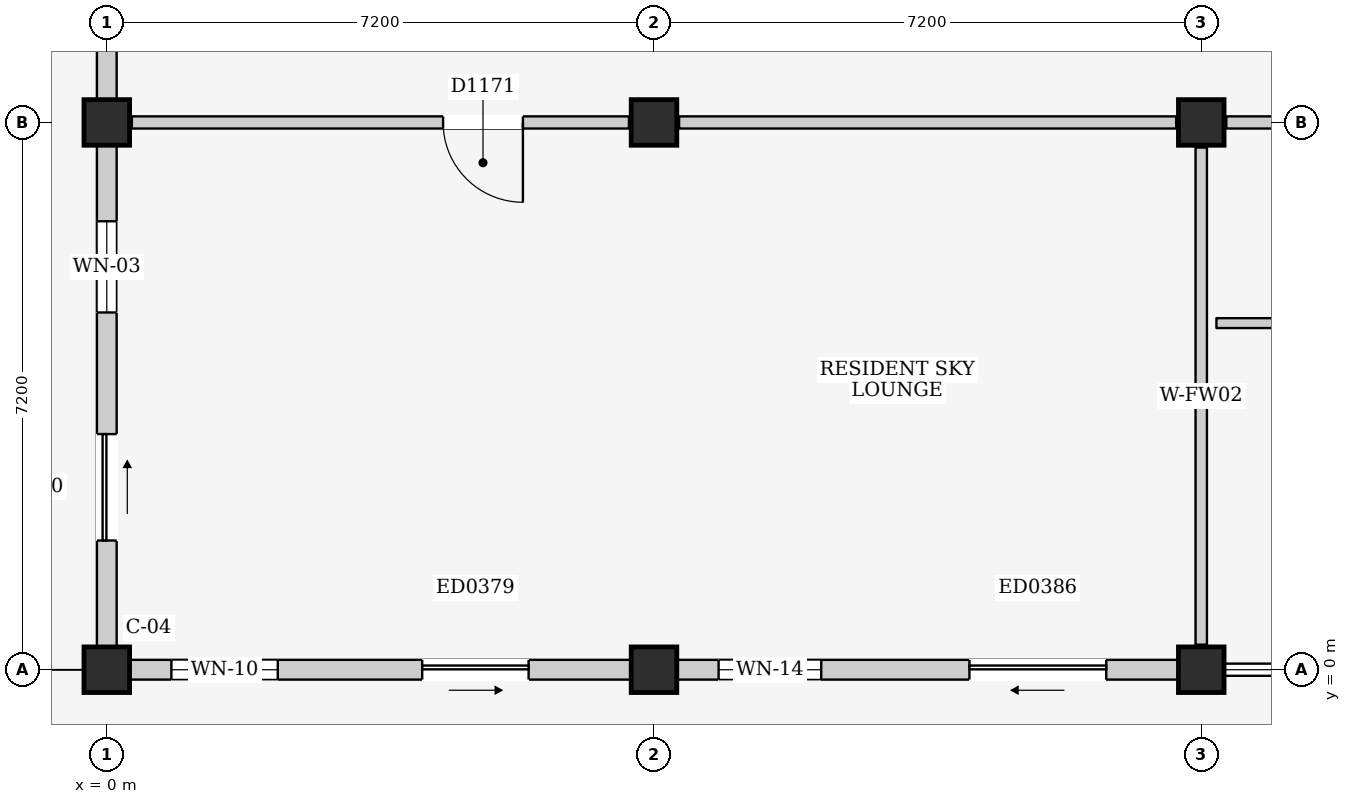
"""IFC4 building model, lengths in metres.
Left out: names, types, materials, properties, quantities, classifications, styles, units other than length and angle.
Written with IfcOpenShell. Run it as: python <this file> out.ifc"""

import sys

from ifc_helpers import new_model, si_unit, direction, frame, frame_2d, origin, origin_2d, place, context, subcontext, project, spatial, rectangle, extrude, element, fill, save


model = new_model("IFC4")
c1 = context("Model", 3, precision=1e-05, world=origin(), true_north=direction((0.0, 1.0)))
c2 = subcontext(c1, "Body", "Model", "MODEL_VIEW")
j1 = project(units=[si_unit("LENGTHUNIT", "METRE"), si_unit("PLANEANGLEUNIT", "RADIAN")], contexts=[c1])
p1 = place(None, origin())
s1 = spatial("IfcSite", under=j1, at=p1, CompositionType="ELEMENT")
p2 = place(p1, origin())
s2 = spatial("IfcBuilding", under=s1, at=p2, CompositionType="ELEMENT")
p3 = place(p2, frame((0.0, 0.0, 15.4)))
s3 = spatial("IfcBuildingStorey", under=s2, at=p3, CompositionType="ELEMENT", Elevation=15.4)
for number, where, z_axis, x_axis in (
    (1, (0.0, 0.0, 0.0), (0.0, 0.0, 1.0), (1.0, 0.0, 0.0)),
    (2, (0.0, 7.2, 0.0), (0.0, 0.0, 1.0), (1.0, 0.0, 0.0)),
    (3, (7.2, 0.0, 0.0), (0.0, 0.0, 1.0), (1.0, 0.0, 0.0)),
    (4, (7.2, 7.2, 0.0), (0.0, 0.0, 1.0), (1.0, 0.0, 0.0)),
    (5, (14.4, 0.0, 0.0), (0.0, 0.0, 1.0), (1.0, 0.0, 0.0)),
    (6, (14.4, 7.2, 0.0), (0.0, 0.0, 1.0), (1.0, 0.0, 0.0)),
):
    element("IfcColumn", number, at=place(p3, frame(where, z_axis=z_axis, x_axis=x_axis)), inside=s3, PredefinedType="COLUMN", context=c2, shape_type="SweptSolid", body=[
        extrude(rectangle(XDim=0.6, YDim=0.6, at=origin_2d()), origin(), (0.0, 0.0, 1.0), 3.2),
    ])
p4 = place(p3, frame((0.3, 0.0, 0.0), z_axis=(0.0, 0.0, 1.0), x_axis=(1.0, 0.0, 0.0)))
e7 = element("IfcWall", 7, at=p4, inside=s3, PredefinedType="ELEMENTEDWALL", context=c2, shape_type="SweptSolid", body=[
    extrude(rectangle(XDim=6.6, YDim=0.26, at=frame_2d((3.3, 0.0))), origin(), (0.0, 0.0, 1.0), 2.43),
])
p5 = place(p4, frame((3.85, 0.0, 0.0)))
e8 = element("IfcOpeningElement", 8, at=p5, cuts=e7, PredefinedType="OPENING", context=c2, shape_type="SweptSolid", body=[
    extrude(rectangle(XDim=1.4, YDim=2.1, at=frame_2d((0.7, 1.05))), frame((0.0, 0.145, 0.0), z_axis=(0.0, -1.0, 0.0), x_axis=(1.0, 0.0, 0.0)), (0.0, 0.0, 1.0), 0.29),
])
p6 = place(p4, frame((0.55, 0.0, 0.9)))
e9 = element("IfcOpeningElement", 9, at=p6, cuts=e7, PredefinedType="OPENING", context=c2, shape_type="SweptSolid", body=[
    extrude(rectangle(XDim=1.4, YDim=1.2, at=frame_2d((0.7, 0.6))), frame((0.0, 0.145, 0.0), z_axis=(0.0, -1.0, 0.0), x_axis=(1.0, 0.0, 0.0)), (0.0, 0.0, 1.0), 0.29),
])
p7 = place(p3, frame((0.0, 0.3, 0.0), z_axis=(0.0, 0.0, 1.0), x_axis=(0.0, 1.0, 0.0)))
e10 = element("IfcWall", 10, at=p7, inside=s3, PredefinedType="ELEMENTEDWALL", context=c2, shape_type="SweptSolid", body=[
    extrude(rectangle(XDim=6.6, YDim=0.26, at=frame_2d((3.3, 0.0))), origin(), (0.0, 0.0, 1.0), 2.43),
])
p8 = place(p7, frame((1.4, 0.0, 0.0)))
e11 = element("IfcOpeningElement", 11, at=p8, cuts=e10, PredefinedType="OPENING", context=c2, shape_type="SweptSolid", body=[
    extrude(rectangle(XDim=1.4, YDim=2.1, at=frame_2d((0.7, 1.05))), frame((0.0, 0.145, 0.0), z_axis=(0.0, -1.0, 0.0), x_axis=(1.0, 0.0, 0.0)), (0.0, 0.0, 1.0), 0.29),
])
p9 = place(p7, frame((4.4, 0.0, 0.95)))
e12 = element("IfcOpeningElement", 12, at=p9, cuts=e10, PredefinedType="OPENING", context=c2, shape_type="SweptSolid", body=[
    extrude(rectangle(XDim=1.2, YDim=1.35, at=frame_2d((0.6, 0.675))), frame((0.0, 0.145, 0.0), z_axis=(0.0, -1.0, 0.0), x_axis=(1.0, 0.0, 0.0)), (0.0, 0.0, 1.0), 0.29),
])
p10 = place(p3, frame((0.0, 7.5, 0.0), z_axis=(0.0, 0.0, 1.0), x_axis=(0.0, 1.0, 0.0)))
e13 = element("IfcWall", 13, at=p10, inside=s3, PredefinedType="ELEMENTEDWALL", context=c2, shape_type="SweptSolid", body=[
    extrude(rectangle(XDim=6.6, YDim=0.26, at=frame_2d((3.3, 0.0))), origin(), (0.0, 0.0, 1.0), 2.43),
])
p11 = place(p10, frame((3.65, 0.0, 0.0)))
e14 = element("IfcOpeningElement", 14, at=p11, cuts=e13, PredefinedType="OPENING", context=c2, shape_type="SweptSolid", body=[
    extrude(rectangle(XDim=1.4, YDim=2.1, at=frame_2d((0.7, 1.05))), frame((0.0, 0.145, 0.0), z_axis=(0.0, -1.0, 0.0), x_axis=(1.0, 0.0, 0.0)), (0.0, 0.0, 1.0), 0.29),
])
p12 = place(p3, frame((7.5, 0.0, 0.0), z_axis=(0.0, 0.0, 1.0), x_axis=(1.0, 0.0, 0.0)))
e15 = element("IfcWall", 15, at=p12, inside=s3, PredefinedType="ELEMENTEDWALL", context=c2, shape_type="SweptSolid", body=[
    extrude(rectangle(XDim=6.6, YDim=0.26, at=frame_2d((3.3, 0.0))), origin(), (0.0, 0.0, 1.0), 2.43),
])
p13 = place(p12, frame((3.85, 0.0, 0.0)))
e16 = element("IfcOpeningElement", 16, at=p13, cuts=e15, PredefinedType="OPENING", context=c2, shape_type="SweptSolid", body=[
    extrude(rectangle(XDim=1.8, YDim=2.12, at=frame_2d((0.9, 1.06))), frame((0.0, 0.145, 0.0), z_axis=(0.0, -1.0, 0.0), x_axis=(1.0, 0.0, 0.0)), (0.0, 0.0, 1.0), 0.29),
])
p14 = place(p12, frame((0.55, 0.0, 0.81)))
e17 = element("IfcOpeningElement", 17, at=p14, cuts=e15, PredefinedType="OPENING", context=c2, shape_type="SweptSolid", body=[
    extrude(rectangle(XDim=1.35, YDim=1.5, at=frame_2d((0.675, 0.75))), frame((0.0, 0.145, 0.0), z_axis=(0.0, -1.0, 0.0), x_axis=(1.0, 0.0, 0.0)), (0.0, 0.0, 1.0), 0.29),
])
p15 = place(p3, frame((0.33, 7.2, 0.0), z_axis=(0.0, 0.0, 1.0), x_axis=(1.0, 0.0, 0.0)))
e18 = element("IfcWall", 18, at=p15, inside=s3, PredefinedType="PARTITIONING", context=c2, shape_type="SweptSolid", body=[
    extrude(rectangle(XDim=6.54, YDim=0.16, at=frame_2d((3.27, 0.0))), origin(), (0.0, 0.0, 1.0), 2.335),
])
p16 = place(p15, frame((4.095, 0.0, 0.0)))
e19 = element("IfcOpeningElement", 19, at=p16, cuts=e18, PredefinedType="OPENING", context=c2, shape_type="SweptSolid", body=[
    extrude(rectangle(XDim=1.05, YDim=2.2, at=frame_2d((0.525, 1.1))), frame((0.0, 0.095, 0.0), z_axis=(0.0, -1.0, 0.0), x_axis=(1.0, 0.0, 0.0)), (0.0, 0.0, 1.0), 0.19),
])
p17 = place(p3, frame((7.53, 7.2, 0.0), z_axis=(0.0, 0.0, 1.0), x_axis=(1.0, 0.0, 0.0)))
e20 = element("IfcWall", 20, at=p17, inside=s3, PredefinedType="PARTITIONING", context=c2, shape_type="SweptSolid", body=[
    extrude(rectangle(XDim=6.54, YDim=0.16, at=frame_2d((3.27, 0.0))), origin(), (0.0, 0.0, 1.0), 2.335),
])
p18 = place(p3, frame((14.4, 0.33, 0.0), z_axis=(0.0, 0.0, 1.0), x_axis=(0.0, 1.0, 0.0)))
e21 = element("IfcWall", 21, at=p18, inside=s3, PredefinedType="PARTITIONING", context=c2, shape_type="SweptSolid", body=[
    extrude(rectangle(XDim=6.54, YDim=0.15, at=frame_2d((3.27, 0.0))), origin(), (0.0, 0.0, 1.0), 2.385),
])
p19 = place(p3, frame((14.73, 7.2, 0.0), z_axis=(0.0, 0.0, 1.0), x_axis=(1.0, 0.0, 0.0)))
e22 = element("IfcWall", 22, at=p19, inside=s3, PredefinedType="PARTITIONING", context=c2, shape_type="SweptSolid", body=[
    extrude(rectangle(XDim=6.54, YDim=0.16, at=frame_2d((3.27, 0.0))), origin(), (0.0, 0.0, 1.0), 2.335),
])
p20 = place(p19, frame((4.12, 0.0, 0.0)))
e23 = element("IfcOpeningElement", 23, at=p20, cuts=e22, PredefinedType="OPENING", context=c2, shape_type="SweptSolid", body=[
    extrude(rectangle(XDim=1.0, YDim=2.15, at=frame_2d((0.5, 1.075))), frame((0.0, 0.095, 0.0), z_axis=(0.0, -1.0, 0.0), x_axis=(1.0, 0.0, 0.0)), (0.0, 0.0, 1.0), 0.19),
])
p21 = place(p3, frame((14.6, 4.56, 0.0), z_axis=(0.0, 0.0, 1.0), x_axis=(1.0, 0.0, 0.0)))
e24 = element("IfcWall", 24, at=p21, inside=s3, PredefinedType="PARTITIONING", context=c2, shape_type="SweptSolid", body=[
    extrude(rectangle(XDim=2.05, YDim=0.13, at=frame_2d((1.025, 0.0))), origin(), (0.0, 0.0, 1.0), 2.95),
])
p22 = place(p5, frame((1.4, 0.0, 0.0), z_axis=(0.0, 0.0, 1.0), x_axis=(-1.0, 0.0, 0.0)))
e25 = element("IfcDoor", 25, at=p22, inside=s3, OperationType="SLIDING_TO_RIGHT", PredefinedType="DOOR", context=c2, shape_type="SweptSolid", body=[
    extrude(rectangle(XDim=1.4, YDim=2.1, at=frame_2d((0.7, 1.05))), frame((0.0, 0.025, 0.0), z_axis=(0.0, -1.0, 0.0), x_axis=(1.0, 0.0, 0.0)), (0.0, 0.0, 1.0), 0.05),
])
fill(e8, e25)
p23 = place(p6, origin())
e26 = element("IfcWindow", 26, at=p23, inside=s3, PartitioningType="DOUBLE_PANEL_HORIZONTAL", PredefinedType="WINDOW", context=c2, shape_type="SweptSolid", body=[
    extrude(rectangle(XDim=1.4, YDim=1.2, at=frame_2d((0.7, 0.6))), frame((0.0, 0.03, 0.0), z_axis=(0.0, -1.0, 0.0), x_axis=(1.0, 0.0, 0.0)), (0.0, 0.0, 1.0), 0.06),
])
fill(e9, e26)
p24 = place(p8, frame((1.4, 0.0, 0.0), z_axis=(0.0, 0.0, 1.0), x_axis=(-1.0, 0.0, 0.0)))
e27 = element("IfcDoor", 27, at=p24, inside=s3, OperationType="SLIDING_TO_RIGHT", PredefinedType="DOOR", context=c2, shape_type="SweptSolid", body=[
    extrude(rectangle(XDim=1.4, YDim=2.1, at=frame_2d((0.7, 1.05))), frame((0.0, 0.025, 0.0), z_axis=(0.0, -1.0, 0.0), x_axis=(1.0, 0.0, 0.0)), (0.0, 0.0, 1.0), 0.05),
])
fill(e11, e27)
p25 = place(p9, origin())
e28 = element("IfcWindow", 28, at=p25, inside=s3, PartitioningType="SINGLE_PANEL", PredefinedType="WINDOW", context=c2, shape_type="SweptSolid", body=[
    extrude(rectangle(XDim=1.2, YDim=1.35, at=frame_2d((0.6, 0.675))), frame((0.0, 0.03, 0.0), z_axis=(0.0, -1.0, 0.0), x_axis=(1.0, 0.0, 0.0)), (0.0, 0.0, 1.0), 0.06),
])
fill(e12, e28)
p26 = place(p13, frame((1.8, 0.0, 0.0), z_axis=(0.0, 0.0, 1.0), x_axis=(-1.0, 0.0, 0.0)))
e29 = element("IfcDoor", 29, at=p26, inside=s3, OperationType="SLIDING_TO_LEFT", PredefinedType="DOOR", context=c2, shape_type="SweptSolid", body=[
    extrude(rectangle(XDim=1.8, YDim=2.12, at=frame_2d((0.9, 1.06))), frame((0.0, 0.025, 0.0), z_axis=(0.0, -1.0, 0.0), x_axis=(1.0, 0.0, 0.0)), (0.0, 0.0, 1.0), 0.05),
])
fill(e16, e29)
p27 = place(p14, origin())
e30 = element("IfcWindow", 30, at=p27, inside=s3, PartitioningType="SINGLE_PANEL", PredefinedType="WINDOW", context=c2, shape_type="SweptSolid", body=[
    extrude(rectangle(XDim=1.35, YDim=1.5, at=frame_2d((0.675, 0.75))), frame((0.0, 0.03, 0.0), z_axis=(0.0, -1.0, 0.0), x_axis=(1.0, 0.0, 0.0)), (0.0, 0.0, 1.0), 0.06),
])
fill(e17, e30)
p28 = place(p16, frame((1.05, 0.0, 0.0), z_axis=(0.0, 0.0, 1.0), x_axis=(-1.0, 0.0, 0.0)))
e31 = element("IfcDoor", 31, at=p28, inside=s3, OperationType="SINGLE_SWING_LEFT", PredefinedType="DOOR", context=c2, shape_type="SweptSolid", body=[
    extrude(rectangle(XDim=1.05, YDim=2.2, at=frame_2d((0.525, 1.1))), frame((0.0, 0.025, 0.0), z_axis=(0.0, -1.0, 0.0), x_axis=(1.0, 0.0, 0.0)), (0.0, 0.0, 1.0), 0.05),
])
fill(e19, e31)
save(model, sys.argv[1])
